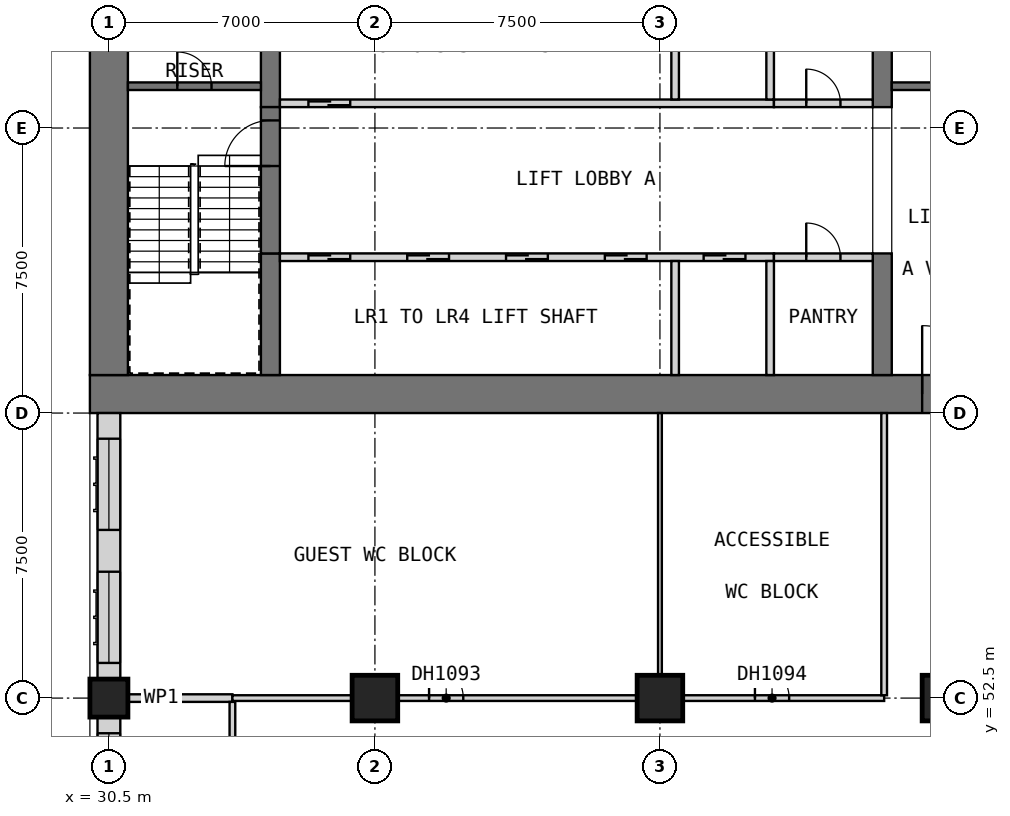
"""IFC4 building model, lengths in metres.
Left out: names, types, materials, properties, quantities, classifications, styles, units other than length and angle.
Written with IfcOpenShell. Run it as: python <this file> out.ifc"""

import sys

from ifc_helpers import new_model, si_unit, direction, frame, frame_2d, origin, origin_2d, place, context, subcontext, project, spatial, rectangle, extrude, element, fill, save


model = new_model("IFC4")
c1 = context("Model", 3, precision=1e-05, world=origin(), true_north=direction((0.0, 1.0)))
c2 = subcontext(c1, "Body", "Model", "MODEL_VIEW")
j1 = project(units=[si_unit("LENGTHUNIT", "METRE"), si_unit("PLANEANGLEUNIT", "RADIAN")], contexts=[c1])
p1 = place(None, origin())
s1 = spatial("IfcSite", under=j1, at=p1, CompositionType="ELEMENT")
p2 = place(p1, origin())
s2 = spatial("IfcBuilding", under=s1, at=p2, CompositionType="ELEMENT")
p3 = place(p2, frame((0.0, 0.0, 48.4)))
s3 = spatial("IfcBuildingStorey", under=s2, at=p3, CompositionType="ELEMENT", Elevation=48.4)
p4 = place(p3, frame((30.5, 52.5, 0.0), z_axis=(0.0, 0.0, 1.0), x_axis=(1.0, 0.0, 0.0)))
e1 = element("IfcColumn", 1, at=p4, inside=s3, PredefinedType="COLUMN", context=c2, shape_type="SweptSolid", body=[
    extrude(rectangle(XDim=1.0, YDim=1.0, at=origin_2d()), origin(), (0.0, 0.0, 1.0), 3.6),
])
for number, where, z_axis, x_axis in (
    (2, (37.5, 52.5, 0.0), (0.0, 0.0, 1.0), (1.0, 0.0, 0.0)),
    (3, (45.0, 52.5, 0.0), (0.0, 0.0, 1.0), (1.0, 0.0, 0.0)),
    (4, (52.5, 52.5, 0.0), (0.0, 0.0, 1.0), (1.0, 0.0, 0.0)),
):
    element("IfcColumn", number, at=place(p3, frame(where, z_axis=z_axis, x_axis=x_axis)), inside=s3, PredefinedType="COLUMN", context=c2, shape_type="SweptSolid", body=[
        extrude(rectangle(XDim=1.2, YDim=1.2, at=origin_2d()), origin(), (0.0, 0.0, 1.0), 3.6),
    ])
p5 = place(p3, frame((30.0, 60.5, 0.0), z_axis=(0.0, 0.0, 1.0), x_axis=(1.0, 0.0, 0.0)))
e5 = element("IfcWall", 5, at=p5, inside=s3, PredefinedType="SHEAR", context=c2, shape_type="SweptSolid", body=[
    extrude(rectangle(XDim=30.0, YDim=1.0, at=frame_2d((15.0, 0.0))), origin(), (0.0, 0.0, 1.0), 3.6),
])
p6 = place(p5, frame((21.9, 0.0, 0.0)))
e6 = element("IfcOpeningElement", 6, at=p6, cuts=e5, PredefinedType="OPENING", context=c2, shape_type="SweptSolid", body=[
    extrude(rectangle(XDim=1.8, YDim=2.1, at=frame_2d((0.9, 1.05))), frame((0.0, 0.51, 0.0), z_axis=(0.0, -1.0, 0.0), x_axis=(1.0, 0.0, 0.0)), (0.0, 0.0, 1.0), 1.02),
])
p7 = place(p5, frame((26.5, 0.0, 0.0)))
e7 = element("IfcOpeningElement", 7, at=p7, cuts=e5, PredefinedType="OPENING", context=c2, shape_type="SweptSolid", body=[
    extrude(rectangle(XDim=1.2, YDim=2.1, at=frame_2d((0.6, 1.05))), frame((0.0, 0.51, 0.0), z_axis=(0.0, -1.0, 0.0), x_axis=(1.0, 0.0, 0.0)), (0.0, 0.0, 1.0), 1.02),
])
p8 = place(p3, frame((30.5, 61.0, 0.0), z_axis=(0.0, 0.0, 1.0), x_axis=(0.0, 1.0, 0.0)))
e8 = element("IfcWall", 8, at=p8, inside=s3, PredefinedType="SHEAR", context=c2, shape_type="SweptSolid", body=[
    extrude(rectangle(XDim=20.5, YDim=1.0, at=frame_2d((10.25, 0.0))), origin(), (0.0, 0.0, 1.0), 3.6),
])
p9 = place(p3, frame((34.75, 61.0, 0.0), z_axis=(0.0, 0.0, 1.0), x_axis=(0.0, 1.0, 0.0)))
e9 = element("IfcWall", 9, at=p9, inside=s3, PredefinedType="SHEAR", context=c2, shape_type="SweptSolid", body=[
    extrude(rectangle(XDim=3.2, YDim=0.5, at=frame_2d((1.6, 0.0))), origin(), (0.0, 0.0, 1.0), 3.6),
])
p10 = place(p3, frame((34.75, 68.05, 0.0), z_axis=(0.0, 0.0, 1.0), x_axis=(0.0, 1.0, 0.0)))
e10 = element("IfcWall", 10, at=p10, inside=s3, PredefinedType="SHEAR", context=c2, shape_type="SweptSolid", body=[
    extrude(rectangle(XDim=6.4, YDim=0.5, at=frame_2d((3.2, 0.0))), origin(), (0.0, 0.0, 1.0), 3.6),
])
p11 = place(p3, frame((50.85, 61.0, 0.0), z_axis=(0.0, 0.0, 1.0), x_axis=(0.0, 1.0, 0.0)))
e11 = element("IfcWall", 11, at=p11, inside=s3, PredefinedType="SHEAR", context=c2, shape_type="SweptSolid", body=[
    extrude(rectangle(XDim=3.2, YDim=0.5, at=frame_2d((1.6, 0.0))), origin(), (0.0, 0.0, 1.0), 3.6),
])
p12 = place(p3, frame((50.85, 68.05, 0.0), z_axis=(0.0, 0.0, 1.0), x_axis=(0.0, 1.0, 0.0)))
e12 = element("IfcWall", 12, at=p12, inside=s3, PredefinedType="SHEAR", context=c2, shape_type="SweptSolid", body=[
    extrude(rectangle(XDim=6.4, YDim=0.5, at=frame_2d((3.2, 0.0))), origin(), (0.0, 0.0, 1.0), 3.6),
])
p13 = place(p2, frame((0.0, 0.0, 34.0)))
s4 = spatial("IfcBuildingStorey", under=s2, at=p13, CompositionType="ELEMENT", Elevation=34.0)
for number, where, z_axis, x_axis in (
    (13, (29.7, 61.05, 0.0), (0.0, 0.0, 1.0), (0.0, 1.0, 0.0)),
    (14, (29.7, 65.925, 0.0), (0.0, 0.0, 1.0), (0.0, 1.0, 0.0)),
):
    element("IfcWall", number, at=place(p13, frame(where, z_axis=z_axis, x_axis=x_axis)), inside=s4, PredefinedType="SOLIDWALL", context=c2, shape_type="SweptSolid", body=[
        extrude(rectangle(XDim=0.9, YDim=0.6, at=frame_2d((0.45, 0.0))), origin(), (0.0, 0.0, 1.0), 286.2),
    ])
p14 = place(p3, frame((30.5, 60.0, 0.0), z_axis=(0.0, 0.0, 1.0), x_axis=(0.0, -1.0, 0.0)))
e15 = element("IfcWall", 15, at=p14, inside=s3, PredefinedType="SOLIDWALL", context=c2, shape_type="SweptSolid", body=[
    extrude(rectangle(XDim=7.0, YDim=0.6, at=frame_2d((3.5, 0.0))), origin(), (0.0, 0.0, 1.0), 3.35),
])
p15 = place(p14, frame((4.175, 0.0, 0.8)))
e16 = element("IfcOpeningElement", 16, at=p15, cuts=e15, PredefinedType="OPENING", context=c2, shape_type="SweptSolid", body=[
    extrude(rectangle(XDim=2.4, YDim=1.8, at=frame_2d((1.2, 0.9))), frame((0.0, 0.31, 0.0), z_axis=(0.0, -1.0, 0.0), x_axis=(1.0, 0.0, 0.0)), (0.0, 0.0, 1.0), 0.62),
])
p16 = place(p14, frame((0.675, 0.0, 0.8)))
e17 = element("IfcOpeningElement", 17, at=p16, cuts=e15, PredefinedType="OPENING", context=c2, shape_type="SweptSolid", body=[
    extrude(rectangle(XDim=2.4, YDim=1.8, at=frame_2d((1.2, 0.9))), frame((0.0, 0.31, 0.0), z_axis=(0.0, -1.0, 0.0), x_axis=(1.0, 0.0, 0.0)), (0.0, 0.0, 1.0), 0.62),
])
p17 = place(p3, frame((30.5, 52.0, 0.0), z_axis=(0.0, 0.0, 1.0), x_axis=(0.0, -1.0, 0.0)))
e18 = element("IfcWall", 18, at=p17, inside=s3, PredefinedType="SOLIDWALL", context=c2, shape_type="SweptSolid", body=[
    extrude(rectangle(XDim=6.0, YDim=0.6, at=frame_2d((3.0, 0.0))), origin(), (0.0, 0.0, 1.0), 2.85),
])
p18 = place(p17, frame((3.425, 0.0, 0.8)))
e19 = element("IfcOpeningElement", 19, at=p18, cuts=e18, PredefinedType="OPENING", context=c2, shape_type="SweptSolid", body=[
    extrude(rectangle(XDim=2.4, YDim=1.8, at=frame_2d((1.2, 0.9))), frame((0.0, 0.31, 0.0), z_axis=(0.0, -1.0, 0.0), x_axis=(1.0, 0.0, 0.0)), (0.0, 0.0, 1.0), 0.62),
])
p19 = place(p17, frame((0.425, 0.0, 0.8)))
e20 = element("IfcOpeningElement", 20, at=p19, cuts=e18, PredefinedType="OPENING", context=c2, shape_type="SweptSolid", body=[
    extrude(rectangle(XDim=2.4, YDim=1.8, at=frame_2d((1.2, 0.9))), frame((0.0, 0.31, 0.0), z_axis=(0.0, -1.0, 0.0), x_axis=(1.0, 0.0, 0.0)), (0.0, 0.0, 1.0), 0.62),
])
p20 = place(p3, frame((35.0, 64.1, 0.0), z_axis=(0.0, 0.0, 1.0), x_axis=(1.0, 0.0, 0.0)))
e21 = element("IfcWall", 21, at=p20, inside=s3, PredefinedType="SOLIDWALL", context=c2, shape_type="SweptSolid", body=[
    extrude(rectangle(XDim=13.0, YDim=0.2, at=frame_2d((6.5, 0.0))), origin(), (0.0, 0.0, 1.0), 3.6),
])
p21 = place(p20, frame((0.75, 0.0, 0.0)))
e22 = element("IfcOpeningElement", 22, at=p21, cuts=e21, PredefinedType="OPENING", context=c2, shape_type="SweptSolid", body=[
    extrude(rectangle(XDim=1.1, YDim=2.1, at=frame_2d((0.55, 1.05))), frame((0.0, 0.11, 0.0), z_axis=(0.0, -1.0, 0.0), x_axis=(1.0, 0.0, 0.0)), (0.0, 0.0, 1.0), 0.22),
])
p22 = place(p20, frame((3.35, 0.0, 0.0)))
e23 = element("IfcOpeningElement", 23, at=p22, cuts=e21, PredefinedType="OPENING", context=c2, shape_type="SweptSolid", body=[
    extrude(rectangle(XDim=1.1, YDim=2.1, at=frame_2d((0.55, 1.05))), frame((0.0, 0.11, 0.0), z_axis=(0.0, -1.0, 0.0), x_axis=(1.0, 0.0, 0.0)), (0.0, 0.0, 1.0), 0.22),
])
p23 = place(p20, frame((5.95, 0.0, 0.0)))
e24 = element("IfcOpeningElement", 24, at=p23, cuts=e21, PredefinedType="OPENING", context=c2, shape_type="SweptSolid", body=[
    extrude(rectangle(XDim=1.1, YDim=2.1, at=frame_2d((0.55, 1.05))), frame((0.0, 0.11, 0.0), z_axis=(0.0, -1.0, 0.0), x_axis=(1.0, 0.0, 0.0)), (0.0, 0.0, 1.0), 0.22),
])
p24 = place(p20, frame((8.55, 0.0, 0.0)))
e25 = element("IfcOpeningElement", 25, at=p24, cuts=e21, PredefinedType="OPENING", context=c2, shape_type="SweptSolid", body=[
    extrude(rectangle(XDim=1.1, YDim=2.1, at=frame_2d((0.55, 1.05))), frame((0.0, 0.11, 0.0), z_axis=(0.0, -1.0, 0.0), x_axis=(1.0, 0.0, 0.0)), (0.0, 0.0, 1.0), 0.22),
])
p25 = place(p20, frame((11.15, 0.0, 0.0)))
e26 = element("IfcOpeningElement", 26, at=p25, cuts=e21, PredefinedType="OPENING", context=c2, shape_type="SweptSolid", body=[
    extrude(rectangle(XDim=1.1, YDim=2.1, at=frame_2d((0.55, 1.05))), frame((0.0, 0.11, 0.0), z_axis=(0.0, -1.0, 0.0), x_axis=(1.0, 0.0, 0.0)), (0.0, 0.0, 1.0), 0.22),
])
for number, where, z_axis, x_axis in (
    (27, (45.4, 61.0, 0.0), (0.0, 0.0, 1.0), (0.0, 1.0, 0.0)),
    (28, (47.9, 61.0, 0.0), (0.0, 0.0, 1.0), (0.0, 1.0, 0.0)),
):
    element("IfcWall", number, at=place(p3, frame(where, z_axis=z_axis, x_axis=x_axis)), inside=s3, PredefinedType="SOLIDWALL", context=c2, shape_type="SweptSolid", body=[
        extrude(rectangle(XDim=3.0, YDim=0.2, at=frame_2d((1.5, 0.0))), origin(), (0.0, 0.0, 1.0), 3.6),
    ])
p26 = place(p3, frame((48.0, 64.1, 0.0), z_axis=(0.0, 0.0, 1.0), x_axis=(1.0, 0.0, 0.0)))
e29 = element("IfcWall", 29, at=p26, inside=s3, PredefinedType="PARTITIONING", context=c2, shape_type="SweptSolid", body=[
    extrude(rectangle(XDim=2.6, YDim=0.2, at=frame_2d((1.3, 0.0))), origin(), (0.0, 0.0, 1.0), 3.35),
])
p27 = place(p26, frame((0.85, 0.0, 0.0)))
e30 = element("IfcOpeningElement", 30, at=p27, cuts=e29, PredefinedType="OPENING", context=c2, shape_type="SweptSolid", body=[
    extrude(rectangle(XDim=0.9, YDim=2.1, at=frame_2d((0.45, 1.05))), frame((0.0, 0.11, 0.0), z_axis=(0.0, -1.0, 0.0), x_axis=(1.0, 0.0, 0.0)), (0.0, 0.0, 1.0), 0.22),
])
p28 = place(p3, frame((35.0, 68.15, 0.0), z_axis=(0.0, 0.0, 1.0), x_axis=(1.0, 0.0, 0.0)))
e31 = element("IfcWall", 31, at=p28, inside=s3, PredefinedType="SOLIDWALL", context=c2, shape_type="SweptSolid", body=[
    extrude(rectangle(XDim=13.0, YDim=0.2, at=frame_2d((6.5, 0.0))), origin(), (0.0, 0.0, 1.0), 3.6),
])
p29 = place(p28, frame((0.75, 0.0, 0.0)))
e32 = element("IfcOpeningElement", 32, at=p29, cuts=e31, PredefinedType="OPENING", context=c2, shape_type="SweptSolid", body=[
    extrude(rectangle(XDim=1.1, YDim=2.1, at=frame_2d((0.55, 1.05))), frame((0.0, 0.11, 0.0), z_axis=(0.0, -1.0, 0.0), x_axis=(1.0, 0.0, 0.0)), (0.0, 0.0, 1.0), 0.22),
])
for number, where, z_axis, x_axis in (
    (33, (45.4, 68.25, 0.0), (0.0, 0.0, 1.0), (0.0, 1.0, 0.0)),
    (34, (47.9, 68.25, 0.0), (0.0, 0.0, 1.0), (0.0, 1.0, 0.0)),
):
    element("IfcWall", number, at=place(p3, frame(where, z_axis=z_axis, x_axis=x_axis)), inside=s3, PredefinedType="SOLIDWALL", context=c2, shape_type="SweptSolid", body=[
        extrude(rectangle(XDim=2.75, YDim=0.2, at=frame_2d((1.375, 0.0))), origin(), (0.0, 0.0, 1.0), 3.6),
    ])
p30 = place(p3, frame((48.0, 68.15, 0.0), z_axis=(0.0, 0.0, 1.0), x_axis=(1.0, 0.0, 0.0)))
e35 = element("IfcWall", 35, at=p30, inside=s3, PredefinedType="PARTITIONING", context=c2, shape_type="SweptSolid", body=[
    extrude(rectangle(XDim=2.6, YDim=0.2, at=frame_2d((1.3, 0.0))), origin(), (0.0, 0.0, 1.0), 3.35),
])
p31 = place(p30, frame((0.85, 0.0, 0.0)))
e36 = element("IfcOpeningElement", 36, at=p31, cuts=e35, PredefinedType="OPENING", context=c2, shape_type="SweptSolid", body=[
    extrude(rectangle(XDim=0.9, YDim=2.1, at=frame_2d((0.45, 1.05))), frame((0.0, 0.11, 0.0), z_axis=(0.0, -1.0, 0.0), x_axis=(1.0, 0.0, 0.0)), (0.0, 0.0, 1.0), 0.22),
])
p32 = place(p3, frame((34.75, 64.2, 0.0), z_axis=(0.0, 0.0, 1.0), x_axis=(0.0, 1.0, 0.0)))
e37 = element("IfcWall", 37, at=p32, inside=s3, PredefinedType="SOLIDWALL", context=c2, shape_type="SweptSolid", body=[
    extrude(rectangle(XDim=3.85, YDim=0.5, at=frame_2d((1.925, 0.0))), origin(), (0.0, 0.0, 1.0), 2.4),
])
p33 = place(p32, frame((2.3, 0.0, 0.0)))
e38 = element("IfcOpeningElement", 38, at=p33, cuts=e37, PredefinedType="OPENING", context=c2, shape_type="SweptSolid", body=[
    extrude(rectangle(XDim=1.2, YDim=2.1, at=frame_2d((0.6, 1.05))), frame((0.0, 0.26, 0.0), z_axis=(0.0, -1.0, 0.0), x_axis=(1.0, 0.0, 0.0)), (0.0, 0.0, 1.0), 0.52),
])
p34 = place(p3, frame((31.0, 68.6, 0.0), z_axis=(0.0, 0.0, 1.0), x_axis=(1.0, 0.0, 0.0)))
e39 = element("IfcWall", 39, at=p34, inside=s3, PredefinedType="SOLIDWALL", context=c2, shape_type="SweptSolid", body=[
    extrude(rectangle(XDim=3.5, YDim=0.2, at=frame_2d((1.75, 0.0))), origin(), (0.0, 0.0, 1.0), 3.35),
])
p35 = place(p34, frame((1.3, 0.0, 0.0)))
e40 = element("IfcOpeningElement", 40, at=p35, cuts=e39, PredefinedType="OPENING", context=c2, shape_type="SweptSolid", body=[
    extrude(rectangle(XDim=0.9, YDim=2.1, at=frame_2d((0.45, 1.05))), frame((0.0, 0.11, 0.0), z_axis=(0.0, -1.0, 0.0), x_axis=(1.0, 0.0, 0.0)), (0.0, 0.0, 1.0), 0.22),
])
p36 = place(p3, frame((51.1, 68.6, 0.0), z_axis=(0.0, 0.0, 1.0), x_axis=(1.0, 0.0, 0.0)))
e41 = element("IfcWall", 41, at=p36, inside=s3, PredefinedType="SOLIDWALL", context=c2, shape_type="SweptSolid", body=[
    extrude(rectangle(XDim=7.9, YDim=0.2, at=frame_2d((3.95, 0.0))), origin(), (0.0, 0.0, 1.0), 3.35),
])
p37 = place(p3, frame((30.0, 52.5, 0.0), z_axis=(0.0, 0.0, 1.0), x_axis=(1.0, 0.0, 0.0)))
e42 = element("IfcWall", 42, at=p37, inside=s3, PredefinedType="PARTITIONING", context=c2, shape_type="SweptSolid", body=[
    extrude(rectangle(XDim=3.75, YDim=0.2, at=frame_2d((1.875, 0.0))), origin(), (0.0, 0.0, 1.0), 3.35),
])
p38 = place(p3, frame((33.75, 52.5, 0.0), z_axis=(0.0, 0.0, 1.0), x_axis=(1.0, 0.0, 0.0)))
e43 = element("IfcWall", 43, at=p38, inside=s3, PredefinedType="PARTITIONING", context=c2, shape_type="SweptSolid", body=[
    extrude(rectangle(XDim=17.15, YDim=0.15, at=frame_2d((8.575, 0.0))), origin(), (0.0, 0.0, 1.0), 3.35),
])
p39 = place(p38, frame((5.175, 0.0, 0.0)))
e44 = element("IfcOpeningElement", 44, at=p39, cuts=e43, PredefinedType="OPENING", context=c2, shape_type="SweptSolid", body=[
    extrude(rectangle(XDim=0.9, YDim=2.1, at=frame_2d((0.45, 1.05))), frame((0.0, 0.085, 0.0), z_axis=(0.0, -1.0, 0.0), x_axis=(1.0, 0.0, 0.0)), (0.0, 0.0, 1.0), 0.17),
])
p40 = place(p38, frame((13.75, 0.0, 0.0)))
e45 = element("IfcOpeningElement", 45, at=p40, cuts=e43, PredefinedType="OPENING", context=c2, shape_type="SweptSolid", body=[
    extrude(rectangle(XDim=0.9, YDim=2.1, at=frame_2d((0.45, 1.05))), frame((0.0, 0.085, 0.0), z_axis=(0.0, -1.0, 0.0), x_axis=(1.0, 0.0, 0.0)), (0.0, 0.0, 1.0), 0.17),
])
p41 = place(p3, frame((33.75, 50.175, 0.0), z_axis=(0.0, 0.0, 1.0), x_axis=(0.0, 1.0, 0.0)))
e46 = element("IfcWall", 46, at=p41, inside=s3, PredefinedType="PARTITIONING", context=c2, shape_type="SweptSolid", body=[
    extrude(rectangle(XDim=2.225, YDim=0.15, at=frame_2d((1.112, 0.0))), origin(), (0.0, 0.0, 1.0), 3.35),
])
p42 = place(p3, frame((45.0, 52.575, 0.0), z_axis=(0.0, 0.0, 1.0), x_axis=(0.0, 1.0, 0.0)))
e47 = element("IfcWall", 47, at=p42, inside=s3, PredefinedType="PARTITIONING", context=c2, shape_type="SweptSolid", body=[
    extrude(rectangle(XDim=7.425, YDim=0.1, at=frame_2d((3.712, 0.0))), origin(), (0.0, 0.0, 1.0), 3.35),
])
p43 = place(p3, frame((50.9, 52.575, 0.0), z_axis=(0.0, 0.0, 1.0), x_axis=(0.0, 1.0, 0.0)))
e48 = element("IfcWall", 48, at=p43, inside=s3, PredefinedType="PARTITIONING", context=c2, shape_type="SweptSolid", body=[
    extrude(rectangle(XDim=7.425, YDim=0.15, at=frame_2d((3.712, 0.0))), origin(), (0.0, 0.0, 1.0), 3.35),
])
p44 = place(p15, origin())
e49 = element("IfcWindow", 49, at=p44, inside=s3, PartitioningType="SINGLE_PANEL", PredefinedType="WINDOW", context=c2, shape_type="SweptSolid", body=[
    extrude(rectangle(XDim=2.4, YDim=1.8, at=frame_2d((1.2, 0.9))), frame((0.0, -0.07, 0.0), z_axis=(0.0, -1.0, 0.0), x_axis=(1.0, 0.0, 0.0)), (0.0, 0.0, 1.0), 0.06),
])
fill(e16, e49)
p45 = place(p16, origin())
e50 = element("IfcWindow", 50, at=p45, inside=s3, PartitioningType="SINGLE_PANEL", PredefinedType="WINDOW", context=c2, shape_type="SweptSolid", body=[
    extrude(rectangle(XDim=2.4, YDim=1.8, at=frame_2d((1.2, 0.9))), frame((0.0, -0.07, 0.0), z_axis=(0.0, -1.0, 0.0), x_axis=(1.0, 0.0, 0.0)), (0.0, 0.0, 1.0), 0.06),
])
fill(e17, e50)
p46 = place(p19, origin())
e51 = element("IfcWindow", 51, at=p46, inside=s3, PartitioningType="SINGLE_PANEL", PredefinedType="WINDOW", context=c2, shape_type="SweptSolid", body=[
    extrude(rectangle(XDim=2.4, YDim=1.8, at=frame_2d((1.2, 0.9))), frame((0.0, -0.07, 0.0), z_axis=(0.0, -1.0, 0.0), x_axis=(1.0, 0.0, 0.0)), (0.0, 0.0, 1.0), 0.06),
])
fill(e20, e51)
p47 = place(p21, origin())
e52 = element("IfcDoor", 52, at=p47, inside=s3, OperationType="DOUBLE_DOOR_SLIDING", PredefinedType="DOOR", context=c2, shape_type="SweptSolid", body=[
    extrude(rectangle(XDim=1.1, YDim=2.1, at=frame_2d((0.55, 1.05))), frame((0.0, 0.025, 0.0), z_axis=(0.0, -1.0, 0.0), x_axis=(1.0, 0.0, 0.0)), (0.0, 0.0, 1.0), 0.05),
])
fill(e22, e52)
p48 = place(p22, origin())
e53 = element("IfcDoor", 53, at=p48, inside=s3, OperationType="DOUBLE_DOOR_SLIDING", PredefinedType="DOOR", context=c2, shape_type="SweptSolid", body=[
    extrude(rectangle(XDim=1.1, YDim=2.1, at=frame_2d((0.55, 1.05))), frame((0.0, 0.025, 0.0), z_axis=(0.0, -1.0, 0.0), x_axis=(1.0, 0.0, 0.0)), (0.0, 0.0, 1.0), 0.05),
])
fill(e23, e53)
p49 = place(p23, origin())
e54 = element("IfcDoor", 54, at=p49, inside=s3, OperationType="DOUBLE_DOOR_SLIDING", PredefinedType="DOOR", context=c2, shape_type="SweptSolid", body=[
    extrude(rectangle(XDim=1.1, YDim=2.1, at=frame_2d((0.55, 1.05))), frame((0.0, 0.025, 0.0), z_axis=(0.0, -1.0, 0.0), x_axis=(1.0, 0.0, 0.0)), (0.0, 0.0, 1.0), 0.05),
])
fill(e24, e54)
p50 = place(p24, origin())
e55 = element("IfcDoor", 55, at=p50, inside=s3, OperationType="DOUBLE_DOOR_SLIDING", PredefinedType="DOOR", context=c2, shape_type="SweptSolid", body=[
    extrude(rectangle(XDim=1.1, YDim=2.1, at=frame_2d((0.55, 1.05))), frame((0.0, 0.025, 0.0), z_axis=(0.0, -1.0, 0.0), x_axis=(1.0, 0.0, 0.0)), (0.0, 0.0, 1.0), 0.05),
])
fill(e25, e55)
p51 = place(p25, origin())
e56 = element("IfcDoor", 56, at=p51, inside=s3, OperationType="DOUBLE_DOOR_SLIDING", PredefinedType="DOOR", context=c2, shape_type="SweptSolid", body=[
    extrude(rectangle(XDim=1.1, YDim=2.1, at=frame_2d((0.55, 1.05))), frame((0.0, 0.025, 0.0), z_axis=(0.0, -1.0, 0.0), x_axis=(1.0, 0.0, 0.0)), (0.0, 0.0, 1.0), 0.05),
])
fill(e26, e56)
p52 = place(p27, origin())
e57 = element("IfcDoor", 57, at=p52, inside=s3, OperationType="SINGLE_SWING_RIGHT", PredefinedType="DOOR", context=c2, shape_type="SweptSolid", body=[
    extrude(rectangle(XDim=0.9, YDim=2.1, at=frame_2d((0.45, 1.05))), frame((0.0, 0.025, 0.0), z_axis=(0.0, -1.0, 0.0), x_axis=(1.0, 0.0, 0.0)), (0.0, 0.0, 1.0), 0.05),
])
fill(e30, e57)
p53 = place(p29, origin())
e58 = element("IfcDoor", 58, at=p53, inside=s3, OperationType="DOUBLE_DOOR_SLIDING", PredefinedType="DOOR", context=c2, shape_type="SweptSolid", body=[
    extrude(rectangle(XDim=1.1, YDim=2.1, at=frame_2d((0.55, 1.05))), frame((0.0, 0.025, 0.0), z_axis=(0.0, -1.0, 0.0), x_axis=(1.0, 0.0, 0.0)), (0.0, 0.0, 1.0), 0.05),
])
fill(e32, e58)
p54 = place(p31, origin())
e59 = element("IfcDoor", 59, at=p54, inside=s3, OperationType="SINGLE_SWING_RIGHT", PredefinedType="DOOR", context=c2, shape_type="SweptSolid", body=[
    extrude(rectangle(XDim=0.9, YDim=2.1, at=frame_2d((0.45, 1.05))), frame((0.0, 0.025, 0.0), z_axis=(0.0, -1.0, 0.0), x_axis=(1.0, 0.0, 0.0)), (0.0, 0.0, 1.0), 0.05),
])
fill(e36, e59)
p55 = place(p6, origin())
e60 = element("IfcDoor", 60, at=p55, inside=s3, OperationType="DOUBLE_DOOR_SINGLE_SWING", PredefinedType="DOOR", context=c2, shape_type="SweptSolid", body=[
    extrude(rectangle(XDim=1.8, YDim=2.1, at=frame_2d((0.9, 1.05))), frame((0.0, 0.025, 0.0), z_axis=(0.0, -1.0, 0.0), x_axis=(1.0, 0.0, 0.0)), (0.0, 0.0, 1.0), 0.05),
])
fill(e6, e60)
p56 = place(p33, origin())
e61 = element("IfcDoor", 61, at=p56, inside=s3, OperationType="SINGLE_SWING_LEFT", PredefinedType="DOOR", context=c2, shape_type="SweptSolid", body=[
    extrude(rectangle(XDim=1.2, YDim=2.1, at=frame_2d((0.6, 1.05))), frame((0.0, 0.025, 0.0), z_axis=(0.0, -1.0, 0.0), x_axis=(1.0, 0.0, 0.0)), (0.0, 0.0, 1.0), 0.05),
])
fill(e38, e61)
p57 = place(p35, origin())
e62 = element("IfcDoor", 62, at=p57, inside=s3, OperationType="SINGLE_SWING_LEFT", PredefinedType="DOOR", context=c2, shape_type="SweptSolid", body=[
    extrude(rectangle(XDim=0.9, YDim=2.1, at=frame_2d((0.45, 1.05))), frame((0.0, 0.025, 0.0), z_axis=(0.0, -1.0, 0.0), x_axis=(1.0, 0.0, 0.0)), (0.0, 0.0, 1.0), 0.05),
])
fill(e40, e62)
p58 = place(p39, origin())
e63 = element("IfcDoor", 63, at=p58, inside=s3, OperationType="SINGLE_SWING_LEFT", PredefinedType="DOOR", context=c2, shape_type="SweptSolid", body=[
    extrude(rectangle(XDim=0.9, YDim=2.1, at=frame_2d((0.45, 1.05))), frame((0.0, 0.025, 0.0), z_axis=(0.0, -1.0, 0.0), x_axis=(1.0, 0.0, 0.0)), (0.0, 0.0, 1.0), 0.05),
])
fill(e44, e63)
p59 = place(p40, origin())
e64 = element("IfcDoor", 64, at=p59, inside=s3, OperationType="SINGLE_SWING_LEFT", PredefinedType="DOOR", context=c2, shape_type="SweptSolid", body=[
    extrude(rectangle(XDim=0.9, YDim=2.1, at=frame_2d((0.45, 1.05))), frame((0.0, 0.025, 0.0), z_axis=(0.0, -1.0, 0.0), x_axis=(1.0, 0.0, 0.0)), (0.0, 0.0, 1.0), 0.05),
])
fill(e45, e64)
save(model, sys.argv[1])
